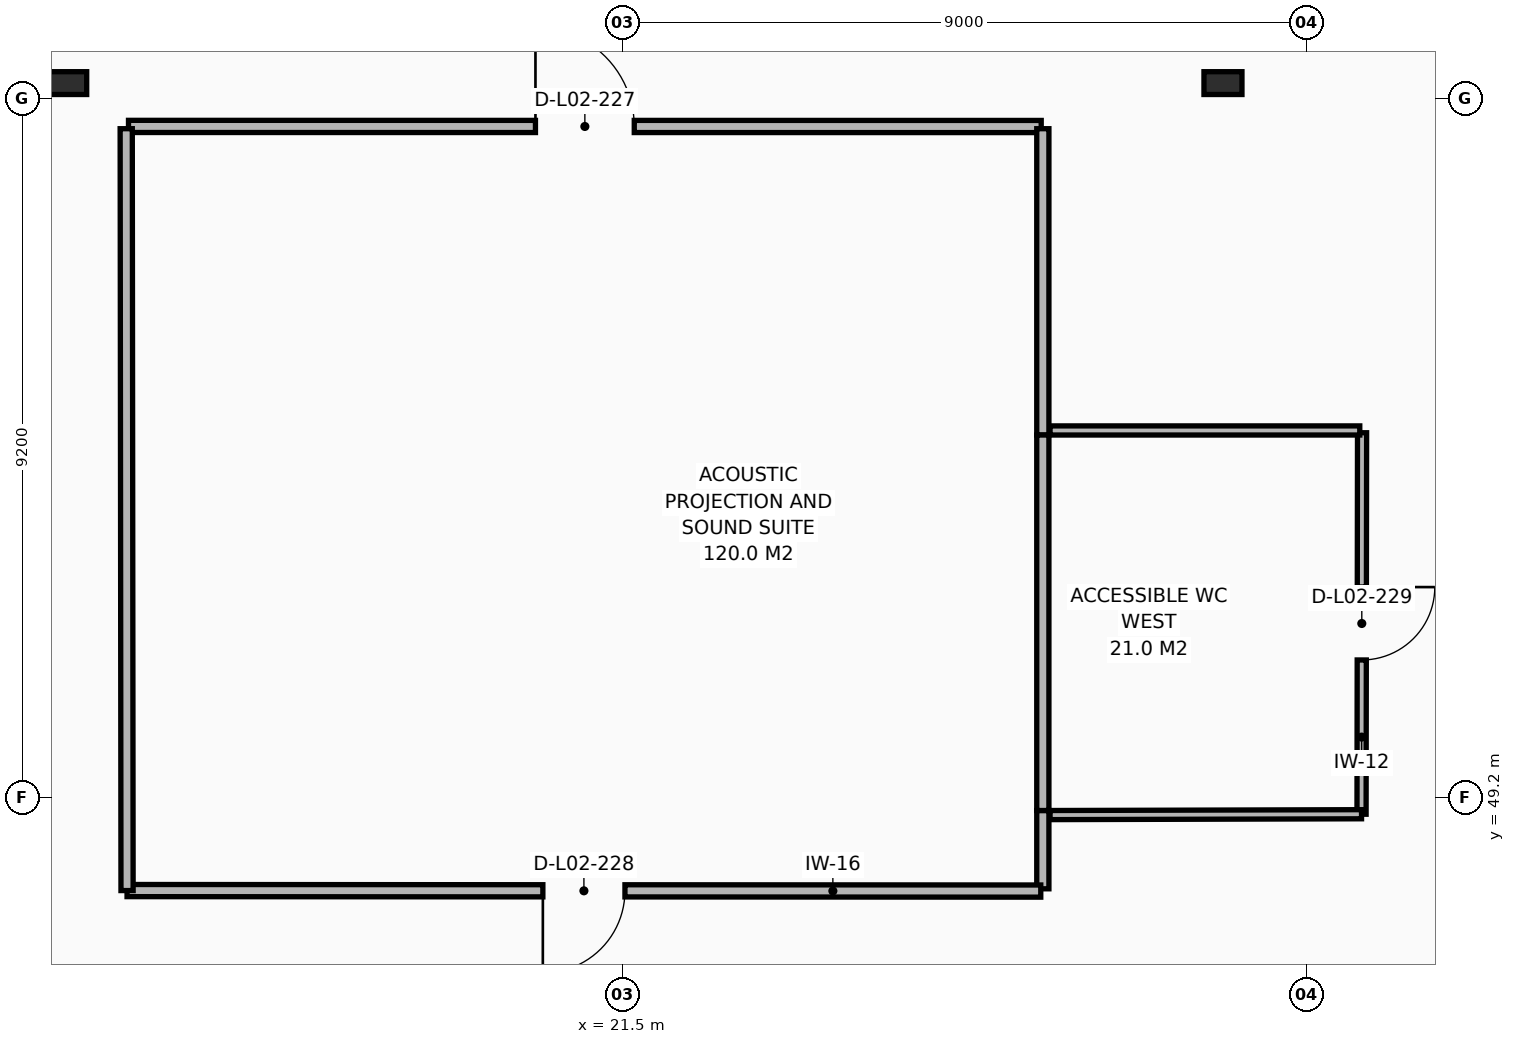
"""IFC4 building model, lengths in metres.
Left out: names, types, materials, properties, quantities, classifications, styles, units other than length and angle.
Written with IfcOpenShell. Run it as: python <this file> out.ifc"""

import sys

from ifc_helpers import new_model, si_unit, direction, frame, frame_2d, origin, origin_2d, place, context, subcontext, project, spatial, rectangle, i_section, extrude, element, fill, save


model = new_model("IFC4")
c1 = context("Model", 3, precision=1e-05, world=origin(), true_north=direction((0.0, 1.0)))
c2 = subcontext(c1, "Body", "Model", "MODEL_VIEW")
j1 = project(units=[si_unit("LENGTHUNIT", "METRE"), si_unit("PLANEANGLEUNIT", "RADIAN")], contexts=[c1])
p1 = place(None, origin())
s1 = spatial("IfcSite", under=j1, at=p1, CompositionType="ELEMENT")
p2 = place(p1, origin())
s2 = spatial("IfcBuilding", under=s1, at=p2, CompositionType="ELEMENT")
p3 = place(p2, frame((0.0, 0.0, 9.52)))
s3 = spatial("IfcBuildingStorey", under=s2, at=p3, CompositionType="ELEMENT", Elevation=9.52)
for number, where, z_axis, x_axis in (
    (1, (29.4, 58.6, 0.0), (0.0, 0.0, 1.0), (1.0, 0.0, 0.0)),
    (2, (14.2, 58.6, 0.0), (0.0, 0.0, 1.0), (1.0, 0.0, 0.0)),
):
    element("IfcColumn", number, at=place(p3, frame(where, z_axis=z_axis, x_axis=x_axis)), inside=s3, PredefinedType="COLUMN", context=c2, shape_type="SweptSolid", body=[
        extrude(i_section(OverallWidth=0.3, OverallDepth=0.5, WebThickness=0.014, FlangeThickness=0.028, FilletRadius=0.027, at=origin_2d()), origin(), (0.0, 0.0, 1.0), 4.16),
    ])
p4 = place(p3, frame((15.0, 58.03, 0.0), z_axis=(0.0, 0.0, 1.0), x_axis=(0.999999994834, -0.000101650809, 0.0)))
e3 = element("IfcWall", 3, at=p4, inside=s3, PredefinedType="PARTITIONING", context=c2, shape_type="SweptSolid", body=[
    extrude(rectangle(XDim=12.009, YDim=0.16, at=frame_2d((6.004, 0.0))), origin(), (0.0, 0.0, 1.0), 3.33),
])
p5 = place(p4, frame((5.354, 0.0, 0.0)))
e4 = element("IfcOpeningElement", 4, at=p5, cuts=e3, PredefinedType="OPENING", context=c2, shape_type="SweptSolid", body=[
    extrude(rectangle(XDim=1.3, YDim=2.15, at=frame_2d((0.65, 1.075))), frame((0.0, 0.09, 0.0), z_axis=(0.0, -1.0, 0.0), x_axis=(1.0, 0.0, 0.0)), (0.0, 0.0, 1.0), 0.18),
])
p6 = place(p3, frame((27.03, 58.0, 0.0), z_axis=(0.0, 0.0, 1.0), x_axis=(0.0, -1.0, 0.0)))
e5 = element("IfcWall", 5, at=p6, inside=s3, PredefinedType="PARTITIONING", context=c2, shape_type="SweptSolid", body=[
    extrude(rectangle(XDim=4.03, YDim=0.16, at=frame_2d((2.015, 0.0))), origin(), (0.0, 0.0, 1.0), 3.33),
])
p7 = place(p3, frame((27.03, 49.03, 0.0), z_axis=(0.0, 0.0, 1.0), x_axis=(0.0, -1.0, 0.0)))
e6 = element("IfcWall", 6, at=p7, inside=s3, PredefinedType="PARTITIONING", context=c2, shape_type="SweptSolid", body=[
    extrude(rectangle(XDim=1.03, YDim=0.16, at=frame_2d((0.515, 0.0))), origin(), (0.0, 0.0, 1.0), 3.33),
])
p8 = place(p3, frame((27.003, 47.97, 0.0), z_axis=(0.0, 0.0, 1.0), x_axis=(-0.999999849677, 0.000548312334, 0.0)))
e7 = element("IfcWall", 7, at=p8, inside=s3, PredefinedType="PARTITIONING", context=c2, shape_type="SweptSolid", body=[
    extrude(rectangle(XDim=12.022, YDim=0.16, at=frame_2d((6.011, 0.0))), origin(), (0.0, 0.0, 1.0), 3.33),
])
p9 = place(p8, frame((5.471, 0.0, 0.0)))
e8 = element("IfcOpeningElement", 8, at=p9, cuts=e7, PredefinedType="OPENING", context=c2, shape_type="SweptSolid", body=[
    extrude(rectangle(XDim=1.08, YDim=2.12, at=frame_2d((0.54, 1.06))), frame((0.0, 0.09, 0.0), z_axis=(0.0, -1.0, 0.0), x_axis=(1.0, 0.0, 0.0)), (0.0, 0.0, 1.0), 0.18),
])
p10 = place(p3, frame((14.981, 47.977, 0.0), z_axis=(0.0, 0.0, 1.0), x_axis=(-0.001096089952, 0.999999399293, 0.0)))
e9 = element("IfcWall", 9, at=p10, inside=s3, PredefinedType="PARTITIONING", context=c2, shape_type="SweptSolid", body=[
    extrude(rectangle(XDim=10.023, YDim=0.16, at=frame_2d((5.012, 0.0))), origin(), (0.0, 0.0, 1.0), 3.33),
])
p11 = place(p3, frame((31.23, 54.0, 0.0), z_axis=(0.0, 0.0, 1.0), x_axis=(-0.001361998931, -0.999999072479, 0.0)))
e10 = element("IfcWall", 10, at=p11, inside=s3, PredefinedType="PARTITIONING", context=c2, shape_type="SweptSolid", body=[
    extrude(rectangle(XDim=5.019, YDim=0.12, at=frame_2d((2.51, 0.0))), origin(), (0.0, 0.0, 1.0), 3.33),
])
p12 = place(p11, frame((2.03, 0.0, 0.0)))
e11 = element("IfcOpeningElement", 11, at=p12, cuts=e10, PredefinedType="OPENING", context=c2, shape_type="SweptSolid", body=[
    extrude(rectangle(XDim=0.96, YDim=2.1, at=frame_2d((0.48, 1.05))), frame((0.0, 0.07, 0.0), z_axis=(0.0, -1.0, 0.0), x_axis=(1.0, 0.0, 0.0)), (0.0, 0.0, 1.0), 0.14),
])
p13 = place(p3, frame((31.223, 48.981, 0.0), z_axis=(0.0, 0.0, 1.0), x_axis=(-0.99999640666, -0.0026807958, 0.0)))
e12 = element("IfcWall", 12, at=p13, inside=s3, PredefinedType="PARTITIONING", context=c2, shape_type="SweptSolid", body=[
    extrude(rectangle(XDim=4.098, YDim=0.12, at=frame_2d((2.049, 0.0))), origin(), (0.0, 0.0, 1.0), 2.92),
])
p14 = place(p3, frame((27.125, 54.03, 0.0), z_axis=(0.0, 0.0, 1.0), x_axis=(1.0, 0.0, 0.0)))
e13 = element("IfcWall", 13, at=p14, inside=s3, PredefinedType="PARTITIONING", context=c2, shape_type="SweptSolid", body=[
    extrude(rectangle(XDim=4.075, YDim=0.12, at=frame_2d((2.038, 0.0))), origin(), (0.0, 0.0, 1.0), 2.92),
])
p15 = place(p3, frame((27.03, 53.97, 0.0), z_axis=(0.0, 0.0, 1.0), x_axis=(0.0, -1.0, 0.0)))
e14 = element("IfcWall", 14, at=p15, inside=s3, PredefinedType="PARTITIONING", context=c2, shape_type="SweptSolid", body=[
    extrude(rectangle(XDim=4.94, YDim=0.16, at=frame_2d((2.47, 0.0))), origin(), (0.0, 0.0, 1.0), 3.33),
])
p16 = place(p5, origin())
e15 = element("IfcDoor", 15, at=p16, inside=s3, OperationType="SINGLE_SWING_LEFT", PredefinedType="DOOR", context=c2, shape_type="SweptSolid", body=[
    extrude(rectangle(XDim=1.3, YDim=2.15, at=frame_2d((0.65, 1.075))), frame((0.0, 0.025, 0.0), z_axis=(0.0, -1.0, 0.0), x_axis=(1.0, 0.0, 0.0)), (0.0, 0.0, 1.0), 0.05),
])
fill(e4, e15)
p17 = place(p9, origin())
e16 = element("IfcDoor", 16, at=p17, inside=s3, OperationType="SINGLE_SWING_RIGHT", PredefinedType="DOOR", context=c2, shape_type="SweptSolid", body=[
    extrude(rectangle(XDim=1.08, YDim=2.12, at=frame_2d((0.54, 1.06))), frame((0.0, 0.025, 0.0), z_axis=(0.0, -1.0, 0.0), x_axis=(1.0, 0.0, 0.0)), (0.0, 0.0, 1.0), 0.05),
])
fill(e8, e16)
p18 = place(p12, origin())
e17 = element("IfcDoor", 17, at=p18, inside=s3, OperationType="SINGLE_SWING_LEFT", PredefinedType="DOOR", context=c2, shape_type="SweptSolid", body=[
    extrude(rectangle(XDim=0.96, YDim=2.1, at=frame_2d((0.48, 1.05))), frame((0.0, 0.025, 0.0), z_axis=(0.0, -1.0, 0.0), x_axis=(1.0, 0.0, 0.0)), (0.0, 0.0, 1.0), 0.05),
])
fill(e11, e17)
save(model, sys.argv[1])
